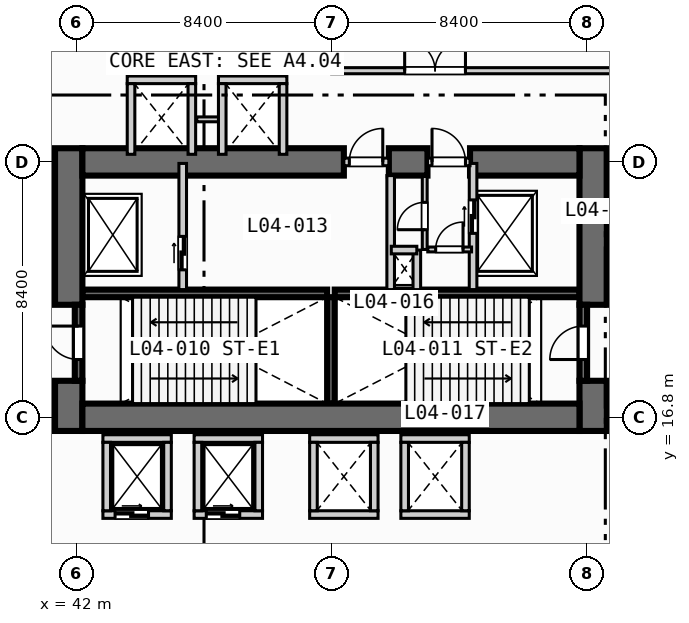
"""IFC4 building model, lengths in metres.
Left out: names, types, materials, properties, quantities, classifications, styles, units other than length and angle.
Written with IfcOpenShell. Run it as: python <this file> out.ifc"""

import sys

from ifc_helpers import new_model, si_unit, direction, frame, frame_2d, origin, place, context, subcontext, project, spatial, rectangle, extrude, element, fill, save


model = new_model("IFC4")
c1 = context("Model", 3, precision=1e-05, world=origin(), true_north=direction((0.0, 1.0)))
c2 = subcontext(c1, "Body", "Model", "MODEL_VIEW")
j1 = project(units=[si_unit("LENGTHUNIT", "METRE"), si_unit("PLANEANGLEUNIT", "RADIAN")], contexts=[c1])
p1 = place(None, origin())
s1 = spatial("IfcSite", under=j1, at=p1, CompositionType="ELEMENT")
p2 = place(p1, origin())
s2 = spatial("IfcBuilding", under=s1, at=p2, CompositionType="ELEMENT")
p3 = place(p2, frame((0.0, 0.0, 20.8)))
s3 = spatial("IfcBuildingStorey", under=s2, at=p3, CompositionType="ELEMENT", Elevation=20.8)
for number, where, z_axis, x_axis in (
    (1, (42.2, 20.875, 0.0), (0.0, 0.0, 1.0), (1.0, 0.0, 0.0)),
    (2, (50.5, 20.875, 0.0), (0.0, 0.0, 1.0), (1.0, 0.0, 0.0)),
):
    element("IfcWall", number, at=place(p3, frame(where, z_axis=z_axis, x_axis=x_axis)), inside=s3, PredefinedType="SOLIDWALL", context=c2, shape_type="SweptSolid", body=[
        extrude(rectangle(XDim=8.05, YDim=0.25, at=frame_2d((4.025, 0.0))), origin(), (0.0, 0.0, 1.0), 4.75),
    ])
p4 = place(p3, frame((50.375, 17.25, 0.0), z_axis=(0.0, 0.0, 1.0), x_axis=(0.0, 1.0, 0.0)))
e3 = element("IfcWall", 3, at=p4, inside=s3, PredefinedType="SOLIDWALL", context=c2, shape_type="SweptSolid", body=[
    extrude(rectangle(XDim=3.5, YDim=0.25, at=frame_2d((1.75, 0.0))), origin(), (0.0, 0.0, 1.0), 4.75),
])
p5 = place(p3, frame((41.75, 16.35, 0.0), z_axis=(0.0, 0.0, 1.0), x_axis=(0.0, 1.0, 0.0)))
e4 = element("IfcWall", 4, at=p5, inside=s3, PredefinedType="SHEAR", context=c2, shape_type="SweptSolid", body=[
    extrude(rectangle(XDim=1.65, YDim=0.9, at=frame_2d((0.825, 0.0))), origin(), (0.0, 0.0, 1.0), 4.75),
])
p6 = place(p3, frame((41.75, 20.5, 0.0), z_axis=(0.0, 0.0, 1.0), x_axis=(0.0, 1.0, 0.0)))
e5 = element("IfcWall", 5, at=p6, inside=s3, PredefinedType="SHEAR", context=c2, shape_type="SweptSolid", body=[
    extrude(rectangle(XDim=5.15, YDim=0.9, at=frame_2d((2.575, 0.0))), origin(), (0.0, 0.0, 1.0), 4.75),
])
p7 = place(p3, frame((59.0, 16.35, 0.0), z_axis=(0.0, 0.0, 1.0), x_axis=(0.0, 1.0, 0.0)))
e6 = element("IfcWall", 6, at=p7, inside=s3, PredefinedType="SHEAR", context=c2, shape_type="SweptSolid", body=[
    extrude(rectangle(XDim=1.65, YDim=0.9, at=frame_2d((0.825, 0.0))), origin(), (0.0, 0.0, 1.0), 4.75),
])
p8 = place(p3, frame((59.0, 20.5, 0.0), z_axis=(0.0, 0.0, 1.0), x_axis=(0.0, 1.0, 0.0)))
e7 = element("IfcWall", 7, at=p8, inside=s3, PredefinedType="SHEAR", context=c2, shape_type="SweptSolid", body=[
    extrude(rectangle(XDim=5.15, YDim=0.9, at=frame_2d((2.575, 0.0))), origin(), (0.0, 0.0, 1.0), 4.75),
])
p9 = place(p3, frame((42.2, 16.8, 0.0), z_axis=(0.0, 0.0, 1.0), x_axis=(1.0, 0.0, 0.0)))
e8 = element("IfcWall", 8, at=p9, inside=s3, PredefinedType="SHEAR", context=c2, shape_type="SweptSolid", body=[
    extrude(rectangle(XDim=16.35, YDim=0.9, at=frame_2d((8.175, 0.0))), origin(), (0.0, 0.0, 1.0), 4.75),
])
p10 = place(p3, frame((42.2, 25.2, 0.0), z_axis=(0.0, 0.0, 1.0), x_axis=(1.0, 0.0, 0.0)))
e9 = element("IfcWall", 9, at=p10, inside=s3, PredefinedType="SHEAR", context=c2, shape_type="SweptSolid", body=[
    extrude(rectangle(XDim=8.6, YDim=0.9, at=frame_2d((4.3, 0.0))), origin(), (0.0, 0.0, 1.0), 4.75),
])
p11 = place(p3, frame((52.28, 25.2, 0.0), z_axis=(0.0, 0.0, 1.0), x_axis=(1.0, 0.0, 0.0)))
e10 = element("IfcWall", 10, at=p11, inside=s3, PredefinedType="SHEAR", context=c2, shape_type="SweptSolid", body=[
    extrude(rectangle(XDim=1.27, YDim=0.9, at=frame_2d((0.635, 0.0))), origin(), (0.0, 0.0, 1.0), 4.75),
])
p12 = place(p3, frame((54.95, 25.2, 0.0), z_axis=(0.0, 0.0, 1.0), x_axis=(1.0, 0.0, 0.0)))
e11 = element("IfcWall", 11, at=p12, inside=s3, PredefinedType="SHEAR", context=c2, shape_type="SweptSolid", body=[
    extrude(rectangle(XDim=3.6, YDim=0.9, at=frame_2d((1.8, 0.0))), origin(), (0.0, 0.0, 1.0), 4.75),
])
p13 = place(p3, frame((42.075, 18.0, 0.0), z_axis=(0.0, 0.0, 1.0), x_axis=(0.0, 1.0, 0.0)))
e12 = element("IfcWall", 12, at=p13, inside=s3, PredefinedType="SOLIDWALL", context=c2, shape_type="SweptSolid", body=[
    extrude(rectangle(XDim=2.5, YDim=0.25, at=frame_2d((1.25, 0.0))), origin(), (0.0, 0.0, 1.0), 4.75),
])
p14 = place(p13, frame((0.7, 0.0, 0.0)))
e13 = element("IfcOpeningElement", 13, at=p14, cuts=e12, PredefinedType="OPENING", context=c2, shape_type="SweptSolid", body=[
    extrude(rectangle(XDim=1.1, YDim=2.15, at=frame_2d((0.55, 1.075))), frame((0.0, 0.135, 0.0), z_axis=(0.0, -1.0, 0.0), x_axis=(1.0, 0.0, 0.0)), (0.0, 0.0, 1.0), 0.27),
])
p15 = place(p3, frame((58.675, 18.0, 0.0), z_axis=(0.0, 0.0, 1.0), x_axis=(0.0, 1.0, 0.0)))
e14 = element("IfcWall", 14, at=p15, inside=s3, PredefinedType="SOLIDWALL", context=c2, shape_type="SweptSolid", body=[
    extrude(rectangle(XDim=2.5, YDim=0.25, at=frame_2d((1.25, 0.0))), origin(), (0.0, 0.0, 1.0), 4.75),
])
p16 = place(p15, frame((0.7, 0.0, 0.0)))
e15 = element("IfcOpeningElement", 15, at=p16, cuts=e14, PredefinedType="OPENING", context=c2, shape_type="SweptSolid", body=[
    extrude(rectangle(XDim=1.1, YDim=2.15, at=frame_2d((0.55, 1.075))), frame((0.0, 0.135, 0.0), z_axis=(0.0, -1.0, 0.0), x_axis=(1.0, 0.0, 0.0)), (0.0, 0.0, 1.0), 0.27),
])
p17 = place(p3, frame((45.5, 21.0, 0.0), z_axis=(0.0, 0.0, 1.0), x_axis=(0.0, 1.0, 0.0)))
e16 = element("IfcWall", 16, at=p17, inside=s3, PredefinedType="SOLIDWALL", context=c2, shape_type="SweptSolid", body=[
    extrude(rectangle(XDim=4.15, YDim=0.25, at=frame_2d((2.075, 0.0))), origin(), (0.0, 0.0, 1.0), 4.75),
])
p18 = place(p17, frame((0.65, 0.0, 0.0)))
e17 = element("IfcOpeningElement", 17, at=p18, cuts=e16, PredefinedType="OPENING", context=c2, shape_type="SweptSolid", body=[
    extrude(rectangle(XDim=1.1, YDim=2.15, at=frame_2d((0.55, 1.075))), frame((0.0, 0.135, 0.0), z_axis=(0.0, -1.0, 0.0), x_axis=(1.0, 0.0, 0.0)), (0.0, 0.0, 1.0), 0.27),
])
p19 = place(p3, frame((50.8, 25.2, 0.0), z_axis=(0.0, 0.0, 1.0), x_axis=(1.0, 0.0, 0.0)))
e18 = element("IfcWall", 18, at=p19, inside=s3, PredefinedType="SOLIDWALL", context=c2, shape_type="SweptSolid", body=[
    extrude(rectangle(XDim=1.48, YDim=0.25, at=frame_2d((0.74, 0.0))), origin(), (0.0, 0.0, 1.0), 4.75),
])
p20 = place(p19, frame((0.18, 0.0, 0.0)))
e19 = element("IfcOpeningElement", 19, at=p20, cuts=e18, PredefinedType="OPENING", context=c2, shape_type="SweptSolid", body=[
    extrude(rectangle(XDim=1.1, YDim=2.15, at=frame_2d((0.55, 1.075))), frame((0.0, 0.135, 0.0), z_axis=(0.0, -1.0, 0.0), x_axis=(1.0, 0.0, 0.0)), (0.0, 0.0, 1.0), 0.27),
])
p21 = place(p3, frame((52.34, 21.0, 0.0), z_axis=(0.0, 0.0, 1.0), x_axis=(0.0, 1.0, 0.0)))
e20 = element("IfcWall", 20, at=p21, inside=s3, PredefinedType="SOLIDWALL", context=c2, shape_type="SweptSolid", body=[
    extrude(rectangle(XDim=3.75, YDim=0.25, at=frame_2d((1.875, 0.0))), origin(), (0.0, 0.0, 1.0), 4.75),
])
p22 = place(p3, frame((55.05, 21.0, 0.0), z_axis=(0.0, 0.0, 1.0), x_axis=(0.0, 1.0, 0.0)))
e21 = element("IfcWall", 21, at=p22, inside=s3, PredefinedType="SOLIDWALL", context=c2, shape_type="SweptSolid", body=[
    extrude(rectangle(XDim=4.15, YDim=0.25, at=frame_2d((2.075, 0.0))), origin(), (0.0, 0.0, 1.0), 4.75),
])
p23 = place(p22, frame((1.85, 0.0, 0.0)))
e22 = element("IfcOpeningElement", 22, at=p23, cuts=e21, PredefinedType="OPENING", context=c2, shape_type="SweptSolid", body=[
    extrude(rectangle(XDim=1.1, YDim=2.15, at=frame_2d((0.55, 1.075))), frame((0.0, 0.135, 0.0), z_axis=(0.0, -1.0, 0.0), x_axis=(1.0, 0.0, 0.0)), (0.0, 0.0, 1.0), 0.27),
])
p24 = place(p3, frame((53.55, 25.2, 0.0), z_axis=(0.0, 0.0, 1.0), x_axis=(1.0, 0.0, 0.0)))
e23 = element("IfcWall", 23, at=p24, inside=s3, PredefinedType="SOLIDWALL", context=c2, shape_type="SweptSolid", body=[
    extrude(rectangle(XDim=1.4, YDim=0.25, at=frame_2d((0.7, 0.0))), origin(), (0.0, 0.0, 1.0), 4.75),
])
p25 = place(p24, frame((0.15, 0.0, 0.0)))
e24 = element("IfcOpeningElement", 24, at=p25, cuts=e23, PredefinedType="OPENING", context=c2, shape_type="SweptSolid", body=[
    extrude(rectangle(XDim=1.1, YDim=2.15, at=frame_2d((0.55, 1.075))), frame((0.0, 0.135, 0.0), z_axis=(0.0, -1.0, 0.0), x_axis=(1.0, 0.0, 0.0)), (0.0, 0.0, 1.0), 0.27),
])
p26 = place(p3, frame((53.2, 21.0, 0.0), z_axis=(0.0, 0.0, 1.0), x_axis=(0.0, 1.0, 0.0)))
e25 = element("IfcWall", 25, at=p26, inside=s3, PredefinedType="SOLIDWALL", context=c2, shape_type="SweptSolid", body=[
    extrude(rectangle(XDim=1.3, YDim=0.25, at=frame_2d((0.65, 0.0))), origin(), (0.0, 0.0, 1.0), 4.75),
])
p27 = place(p3, frame((52.36, 22.3, 0.0), z_axis=(0.0, 0.0, 1.0), x_axis=(1.0, 0.0, 0.0)))
e26 = element("IfcWall", 26, at=p27, inside=s3, PredefinedType="SOLIDWALL", context=c2, shape_type="SweptSolid", body=[
    extrude(rectangle(XDim=0.84, YDim=0.25, at=frame_2d((0.42, 0.0))), origin(), (0.0, 0.0, 1.0), 4.75),
])
p28 = place(p3, frame((53.56, 22.32, 0.0), z_axis=(0.0, 0.0, 1.0), x_axis=(1.0, 0.0, 0.0)))
e27 = element("IfcWall", 27, at=p28, inside=s3, PredefinedType="PARTITIONING", context=c2, shape_type="SweptSolid", body=[
    extrude(rectangle(XDim=1.44, YDim=0.16, at=frame_2d((0.72, 0.0))), origin(), (0.0, 0.0, 1.0), 4.75),
])
p29 = place(p28, frame((0.26, 0.0, 0.0)))
e28 = element("IfcOpeningElement", 28, at=p29, cuts=e27, PredefinedType="OPENING", context=c2, shape_type="SweptSolid", body=[
    extrude(rectangle(XDim=0.9, YDim=2.1, at=frame_2d((0.45, 1.05))), frame((0.0, 0.09, 0.0), z_axis=(0.0, -1.0, 0.0), x_axis=(1.0, 0.0, 0.0)), (0.0, 0.0, 1.0), 0.18),
])
p30 = place(p3, frame((53.46, 22.32, 0.0), z_axis=(0.0, 0.0, 1.0), x_axis=(0.0, 1.0, 0.0)))
e29 = element("IfcWall", 29, at=p30, inside=s3, PredefinedType="PARTITIONING", context=c2, shape_type="SweptSolid", body=[
    extrude(rectangle(XDim=2.4, YDim=0.16, at=frame_2d((1.2, 0.0))), origin(), (0.0, 0.0, 1.0), 4.75),
])
p31 = place(p30, frame((0.65, 0.0, 0.0)))
e30 = element("IfcOpeningElement", 30, at=p31, cuts=e29, PredefinedType="OPENING", context=c2, shape_type="SweptSolid", body=[
    extrude(rectangle(XDim=0.9, YDim=2.1, at=frame_2d((0.45, 1.05))), frame((0.0, 0.09, 0.0), z_axis=(0.0, -1.0, 0.0), x_axis=(1.0, 0.0, 0.0)), (0.0, 0.0, 1.0), 0.18),
])
p32 = place(p3, frame((42.875, 13.6, 0.0), z_axis=(0.0, 0.0, 1.0), x_axis=(1.0, 0.0, 0.0)))
e31 = element("IfcWall", 31, at=p32, inside=s3, PredefinedType="SOLIDWALL", context=c2, shape_type="SweptSolid", body=[
    extrude(rectangle(XDim=2.25, YDim=0.25, at=frame_2d((1.125, 0.0))), origin(), (0.0, 0.0, 1.0), 4.75),
])
p33 = place(p32, frame((0.4, 0.0, 0.0)))
e32 = element("IfcOpeningElement", 32, at=p33, cuts=e31, PredefinedType="OPENING", context=c2, shape_type="SweptSolid", body=[
    extrude(rectangle(XDim=1.1, YDim=2.15, at=frame_2d((0.55, 1.075))), frame((0.0, 0.135, 0.0), z_axis=(0.0, -1.0, 0.0), x_axis=(1.0, 0.0, 0.0)), (0.0, 0.0, 1.0), 0.27),
])
for number, where, z_axis, x_axis in (
    (33, (42.875, 16.1, 0.0), (0.0, 0.0, 1.0), (1.0, 0.0, 0.0)),
    (34, (43.0, 13.725, 0.0), (0.0, 0.0, 1.0), (0.0, 1.0, 0.0)),
    (35, (45.0, 13.725, 0.0), (0.0, 0.0, 1.0), (0.0, 1.0, 0.0)),
):
    element("IfcWall", number, at=place(p3, frame(where, z_axis=z_axis, x_axis=x_axis)), inside=s3, PredefinedType="SOLIDWALL", context=c2, shape_type="SweptSolid", body=[
        extrude(rectangle(XDim=2.25, YDim=0.25, at=frame_2d((1.125, 0.0))), origin(), (0.0, 0.0, 1.0), 4.75),
    ])
p34 = place(p3, frame((45.875, 13.6, 0.0), z_axis=(0.0, 0.0, 1.0), x_axis=(1.0, 0.0, 0.0)))
e36 = element("IfcWall", 36, at=p34, inside=s3, PredefinedType="SOLIDWALL", context=c2, shape_type="SweptSolid", body=[
    extrude(rectangle(XDim=2.25, YDim=0.25, at=frame_2d((1.125, 0.0))), origin(), (0.0, 0.0, 1.0), 4.75),
])
p35 = place(p34, frame((0.4, 0.0, 0.0)))
e37 = element("IfcOpeningElement", 37, at=p35, cuts=e36, PredefinedType="OPENING", context=c2, shape_type="SweptSolid", body=[
    extrude(rectangle(XDim=1.1, YDim=2.15, at=frame_2d((0.55, 1.075))), frame((0.0, 0.135, 0.0), z_axis=(0.0, -1.0, 0.0), x_axis=(1.0, 0.0, 0.0)), (0.0, 0.0, 1.0), 0.27),
])
for number, where, z_axis, x_axis in (
    (38, (45.875, 16.1, 0.0), (0.0, 0.0, 1.0), (1.0, 0.0, 0.0)),
    (39, (46.0, 13.725, 0.0), (0.0, 0.0, 1.0), (0.0, 1.0, 0.0)),
    (40, (48.0, 13.725, 0.0), (0.0, 0.0, 1.0), (0.0, 1.0, 0.0)),
    (41, (49.675, 13.6, 0.0), (0.0, 0.0, 1.0), (1.0, 0.0, 0.0)),
    (42, (49.675, 16.1, 0.0), (0.0, 0.0, 1.0), (1.0, 0.0, 0.0)),
    (43, (49.8, 13.725, 0.0), (0.0, 0.0, 1.0), (0.0, 1.0, 0.0)),
    (44, (51.8, 13.725, 0.0), (0.0, 0.0, 1.0), (0.0, 1.0, 0.0)),
    (45, (52.675, 13.6, 0.0), (0.0, 0.0, 1.0), (1.0, 0.0, 0.0)),
    (46, (52.675, 16.1, 0.0), (0.0, 0.0, 1.0), (1.0, 0.0, 0.0)),
    (47, (52.8, 13.725, 0.0), (0.0, 0.0, 1.0), (0.0, 1.0, 0.0)),
    (48, (54.8, 13.725, 0.0), (0.0, 0.0, 1.0), (0.0, 1.0, 0.0)),
    (49, (43.675, 27.9, 0.0), (0.0, 0.0, 1.0), (1.0, 0.0, 0.0)),
):
    element("IfcWall", number, at=place(p3, frame(where, z_axis=z_axis, x_axis=x_axis)), inside=s3, PredefinedType="SOLIDWALL", context=c2, shape_type="SweptSolid", body=[
        extrude(rectangle(XDim=2.25, YDim=0.25, at=frame_2d((1.125, 0.0))), origin(), (0.0, 0.0, 1.0), 4.75),
    ])
for number, where, z_axis, x_axis in (
    (50, (43.8, 25.45, 0.0), (0.0, 0.0, 1.0), (0.0, 1.0, 0.0)),
    (51, (45.8, 25.45, 0.0), (0.0, 0.0, 1.0), (0.0, 1.0, 0.0)),
):
    element("IfcWall", number, at=place(p3, frame(where, z_axis=z_axis, x_axis=x_axis)), inside=s3, PredefinedType="SOLIDWALL", context=c2, shape_type="SweptSolid", body=[
        extrude(rectangle(XDim=2.325, YDim=0.25, at=frame_2d((1.163, 0.0))), origin(), (0.0, 0.0, 1.0), 4.75),
    ])
p36 = place(p3, frame((45.96, 26.6, 0.0), z_axis=(0.0, 0.0, 1.0), x_axis=(1.0, 0.0, 0.0)))
e52 = element("IfcWall", 52, at=p36, inside=s3, PredefinedType="PARTITIONING", context=c2, shape_type="SweptSolid", body=[
    extrude(rectangle(XDim=0.88, YDim=0.16, at=frame_2d((0.44, 0.0))), origin(), (0.0, 0.0, 1.0), 4.75),
])
p37 = place(p3, frame((46.675, 27.9, 0.0), z_axis=(0.0, 0.0, 1.0), x_axis=(1.0, 0.0, 0.0)))
e53 = element("IfcWall", 53, at=p37, inside=s3, PredefinedType="SOLIDWALL", context=c2, shape_type="SweptSolid", body=[
    extrude(rectangle(XDim=2.25, YDim=0.25, at=frame_2d((1.125, 0.0))), origin(), (0.0, 0.0, 1.0), 4.75),
])
for number, where, z_axis, x_axis in (
    (54, (46.8, 25.45, 0.0), (0.0, 0.0, 1.0), (0.0, 1.0, 0.0)),
    (55, (48.8, 25.45, 0.0), (0.0, 0.0, 1.0), (0.0, 1.0, 0.0)),
):
    element("IfcWall", number, at=place(p3, frame(where, z_axis=z_axis, x_axis=x_axis)), inside=s3, PredefinedType="SOLIDWALL", context=c2, shape_type="SweptSolid", body=[
        extrude(rectangle(XDim=2.325, YDim=0.25, at=frame_2d((1.163, 0.0))), origin(), (0.0, 0.0, 1.0), 4.75),
    ])
p38 = place(p3, frame((50.4, 28.2, 0.0), z_axis=(0.0, 0.0, 1.0), x_axis=(1.0, 0.0, 0.0)))
e56 = element("IfcWall", 56, at=p38, inside=s3, PredefinedType="PARTITIONING", context=c2, shape_type="SweptSolid", body=[
    extrude(rectangle(XDim=38.6, YDim=0.2, at=frame_2d((19.3, 0.0))), origin(), (0.0, 0.0, 1.0), 4.75),
])
p39 = place(p38, frame((2.4, 0.0, 0.0)))
e57 = element("IfcOpeningElement", 57, at=p39, cuts=e56, PredefinedType="OPENING", context=c2, shape_type="SweptSolid", body=[
    extrude(rectangle(XDim=2.0, YDim=2.15, at=frame_2d((1.0, 1.075))), frame((0.0, 0.11, 0.0), z_axis=(0.0, -1.0, 0.0), x_axis=(1.0, 0.0, 0.0)), (0.0, 0.0, 1.0), 0.22),
])
p40 = place(p38, frame((19.8, 0.0, 0.0)))
e58 = element("IfcOpeningElement", 58, at=p40, cuts=e56, PredefinedType="OPENING", context=c2, shape_type="SweptSolid", body=[
    extrude(rectangle(XDim=2.0, YDim=2.15, at=frame_2d((1.0, 1.075))), frame((0.0, 0.11, 0.0), z_axis=(0.0, -1.0, 0.0), x_axis=(1.0, 0.0, 0.0)), (0.0, 0.0, 1.0), 0.22),
])
p41 = place(p38, frame((32.1, 0.0, 0.0)))
e59 = element("IfcOpeningElement", 59, at=p41, cuts=e56, PredefinedType="OPENING", context=c2, shape_type="SweptSolid", body=[
    extrude(rectangle(XDim=2.0, YDim=2.15, at=frame_2d((1.0, 1.075))), frame((0.0, 0.11, 0.0), z_axis=(0.0, -1.0, 0.0), x_axis=(1.0, 0.0, 0.0)), (0.0, 0.0, 1.0), 0.22),
])
p42 = place(p3, frame((50.4, 28.2, 0.0), z_axis=(0.0, 0.0, 1.0), x_axis=(0.0, 1.0, 0.0)))
e60 = element("IfcWall", 60, at=p42, inside=s3, PredefinedType="PARTITIONING", context=c2, shape_type="SweptSolid", body=[
    extrude(rectangle(XDim=13.4, YDim=0.22, at=frame_2d((6.7, 0.0))), origin(), (0.0, 0.0, 1.0), 3.9),
])
p43 = place(p14, origin())
e61 = element("IfcDoor", 61, at=p43, inside=s3, OperationType="SINGLE_SWING_RIGHT", PredefinedType="DOOR", context=c2, shape_type="SweptSolid", body=[
    extrude(rectangle(XDim=1.1, YDim=2.15, at=frame_2d((0.55, 1.075))), frame((0.0, 0.025, 0.0), z_axis=(0.0, -1.0, 0.0), x_axis=(1.0, 0.0, 0.0)), (0.0, 0.0, 1.0), 0.05),
])
fill(e13, e61)
p44 = place(p16, origin())
e62 = element("IfcDoor", 62, at=p44, inside=s3, OperationType="SINGLE_SWING_LEFT", PredefinedType="DOOR", context=c2, shape_type="SweptSolid", body=[
    extrude(rectangle(XDim=1.1, YDim=2.15, at=frame_2d((0.55, 1.075))), frame((0.0, 0.025, 0.0), z_axis=(0.0, -1.0, 0.0), x_axis=(1.0, 0.0, 0.0)), (0.0, 0.0, 1.0), 0.05),
])
fill(e15, e62)
p45 = place(p18, origin())
e63 = element("IfcDoor", 63, at=p45, inside=s3, OperationType="SLIDING_TO_LEFT", PredefinedType="DOOR", context=c2, shape_type="SweptSolid", body=[
    extrude(rectangle(XDim=1.1, YDim=2.15, at=frame_2d((0.55, 1.075))), frame((0.0, 0.025, 0.0), z_axis=(0.0, -1.0, 0.0), x_axis=(1.0, 0.0, 0.0)), (0.0, 0.0, 1.0), 0.05),
])
fill(e17, e63)
p46 = place(p20, origin())
e64 = element("IfcDoor", 64, at=p46, inside=s3, OperationType="SINGLE_SWING_RIGHT", PredefinedType="DOOR", context=c2, shape_type="SweptSolid", body=[
    extrude(rectangle(XDim=1.1, YDim=2.15, at=frame_2d((0.55, 1.075))), frame((0.0, 0.025, 0.0), z_axis=(0.0, -1.0, 0.0), x_axis=(1.0, 0.0, 0.0)), (0.0, 0.0, 1.0), 0.05),
])
fill(e19, e64)
p47 = place(p23, origin())
e65 = element("IfcDoor", 65, at=p47, inside=s3, OperationType="SLIDING_TO_LEFT", PredefinedType="DOOR", context=c2, shape_type="SweptSolid", body=[
    extrude(rectangle(XDim=1.1, YDim=2.15, at=frame_2d((0.55, 1.075))), frame((0.0, 0.025, 0.0), z_axis=(0.0, -1.0, 0.0), x_axis=(1.0, 0.0, 0.0)), (0.0, 0.0, 1.0), 0.05),
])
fill(e22, e65)
p48 = place(p25, origin())
e66 = element("IfcDoor", 66, at=p48, inside=s3, OperationType="SINGLE_SWING_LEFT", PredefinedType="DOOR", context=c2, shape_type="SweptSolid", body=[
    extrude(rectangle(XDim=1.1, YDim=2.15, at=frame_2d((0.55, 1.075))), frame((0.0, 0.025, 0.0), z_axis=(0.0, -1.0, 0.0), x_axis=(1.0, 0.0, 0.0)), (0.0, 0.0, 1.0), 0.05),
])
fill(e24, e66)
p49 = place(p29, origin())
e67 = element("IfcDoor", 67, at=p49, inside=s3, OperationType="SINGLE_SWING_RIGHT", PredefinedType="DOOR", context=c2, shape_type="SweptSolid", body=[
    extrude(rectangle(XDim=0.9, YDim=2.1, at=frame_2d((0.45, 1.05))), frame((0.0, 0.025, 0.0), z_axis=(0.0, -1.0, 0.0), x_axis=(1.0, 0.0, 0.0)), (0.0, 0.0, 1.0), 0.05),
])
fill(e28, e67)
p50 = place(p31, origin())
e68 = element("IfcDoor", 68, at=p50, inside=s3, OperationType="SINGLE_SWING_LEFT", PredefinedType="DOOR", context=c2, shape_type="SweptSolid", body=[
    extrude(rectangle(XDim=0.9, YDim=2.1, at=frame_2d((0.45, 1.05))), frame((0.0, 0.025, 0.0), z_axis=(0.0, -1.0, 0.0), x_axis=(1.0, 0.0, 0.0)), (0.0, 0.0, 1.0), 0.05),
])
fill(e30, e68)
p51 = place(p33, origin())
e69 = element("IfcDoor", 69, at=p51, inside=s3, OperationType="SLIDING_TO_LEFT", PredefinedType="DOOR", context=c2, shape_type="SweptSolid", body=[
    extrude(rectangle(XDim=1.1, YDim=2.15, at=frame_2d((0.55, 1.075))), frame((0.0, 0.025, 0.0), z_axis=(0.0, -1.0, 0.0), x_axis=(1.0, 0.0, 0.0)), (0.0, 0.0, 1.0), 0.05),
])
fill(e32, e69)
p52 = place(p35, origin())
e70 = element("IfcDoor", 70, at=p52, inside=s3, OperationType="SLIDING_TO_LEFT", PredefinedType="DOOR", context=c2, shape_type="SweptSolid", body=[
    extrude(rectangle(XDim=1.1, YDim=2.15, at=frame_2d((0.55, 1.075))), frame((0.0, 0.025, 0.0), z_axis=(0.0, -1.0, 0.0), x_axis=(1.0, 0.0, 0.0)), (0.0, 0.0, 1.0), 0.05),
])
fill(e37, e70)
p53 = place(p39, origin())
e71 = element("IfcDoor", 71, at=p53, inside=s3, OperationType="SINGLE_SWING_LEFT", PredefinedType="DOOR", context=c2, shape_type="SweptSolid", body=[
    extrude(rectangle(XDim=2.0, YDim=2.15, at=frame_2d((1.0, 1.075))), frame((0.0, 0.025, 0.0), z_axis=(0.0, -1.0, 0.0), x_axis=(1.0, 0.0, 0.0)), (0.0, 0.0, 1.0), 0.05),
])
fill(e57, e71)
save(model, sys.argv[1])
